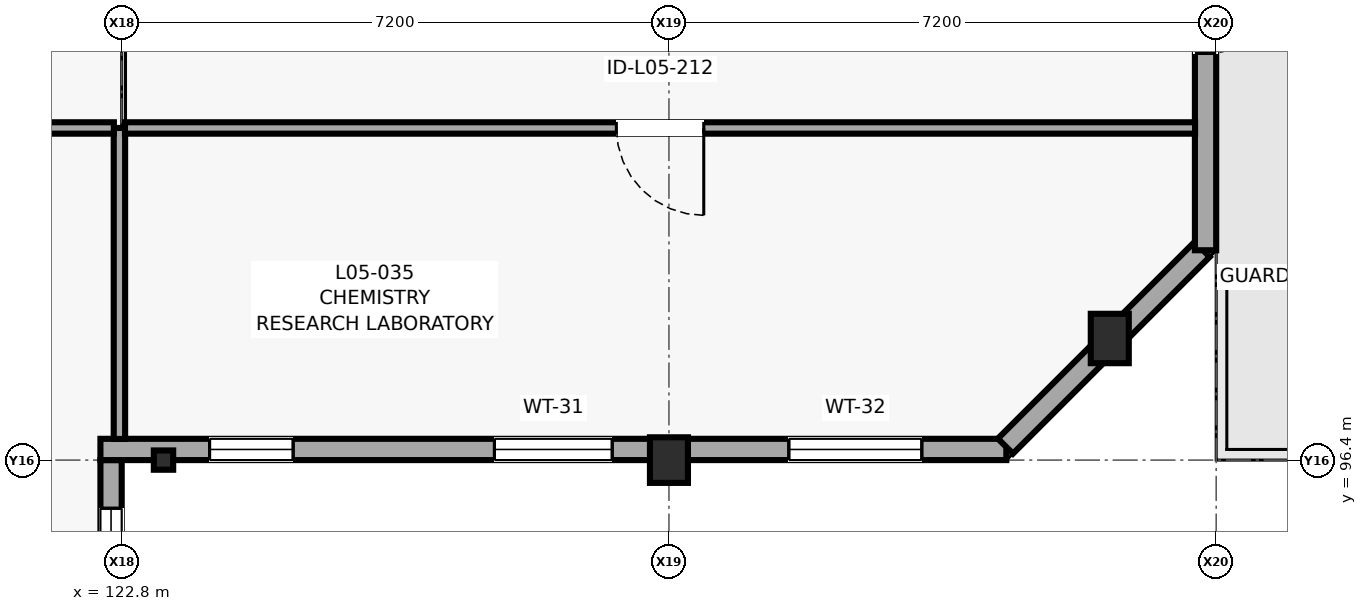
"""IFC4 building model, lengths in metres.
Left out: names, types, materials, properties, quantities, classifications, styles, units other than length and angle.
Written with IfcOpenShell. Run it as: python <this file> out.ifc"""

import sys

from ifc_helpers import new_model, si_unit, direction, frame, frame_2d, origin, origin_2d, place, context, subcontext, project, spatial, polyline, rectangle, i_section, outline, extrude, element, fill, save


model = new_model("IFC4")
c1 = context("Model", 3, precision=1e-05, world=origin(), true_north=direction((0.0, 1.0)))
c2 = subcontext(c1, "Body", "Model", "MODEL_VIEW")
j1 = project(units=[si_unit("LENGTHUNIT", "METRE"), si_unit("PLANEANGLEUNIT", "RADIAN")], contexts=[c1])
p1 = place(None, origin())
s1 = spatial("IfcSite", under=j1, at=p1, CompositionType="ELEMENT")
p2 = place(p1, origin())
s2 = spatial("IfcBuilding", under=s1, at=p2, CompositionType="ELEMENT")
p3 = place(p2, frame((0.0, 0.0, 20.2)))
s3 = spatial("IfcBuildingStorey", under=s2, at=p3, CompositionType="ELEMENT", Elevation=20.2)
p4 = place(p3, frame((123.35, 96.4, 0.0), z_axis=(0.0, 0.0, 1.0), x_axis=(1.0, 0.0, 0.0)))
e1 = element("IfcColumn", 1, at=p4, inside=s3, PredefinedType="COLUMN", context=c2, shape_type="SweptSolid", body=[
    extrude(i_section(OverallWidth=0.255, OverallDepth=0.254, WebThickness=0.009, FlangeThickness=0.014, FilletRadius=0.013, at=origin_2d()), origin(), (0.0, 0.0, 1.0), 4.0),
])
p5 = place(p3, frame((130.0, 96.4, 0.0), z_axis=(0.0, 0.0, 1.0), x_axis=(1.0, 0.0, 0.0)))
e2 = element("IfcColumn", 2, at=p5, inside=s3, PredefinedType="PILASTER", context=c2, shape_type="SweptSolid", body=[
    extrude(rectangle(XDim=0.5, YDim=0.6, at=origin_2d()), origin(), (0.0, 0.0, 1.0), 4.0),
])
p6 = place(p3, frame((135.8, 98.0, 0.0), z_axis=(0.0, 0.0, 1.0), x_axis=(1.0, 0.0, 0.0)))
e3 = element("IfcColumn", 3, at=p6, inside=s3, PredefinedType="COLUMN", context=c2, shape_type="SweptSolid", body=[
    extrude(rectangle(XDim=0.5, YDim=0.65, at=origin_2d()), origin(), (0.0, 0.0, 1.0), 4.0),
])
p7 = place(p3, frame((122.66, 80.13, 0.0), z_axis=(0.0, 0.0, 1.0), x_axis=(0.0, 1.0, 0.0)))
e4 = element("IfcWall", 4, at=p7, inside=s3, PredefinedType="SOLIDWALL", context=c2, shape_type="SweptSolid", body=[
    extrude(rectangle(XDim=16.27, YDim=0.28, at=frame_2d((8.135, 0.0))), origin(), (0.0, 0.0, 1.0), 3.205),
])
p8 = place(p7, frame((1.134, 0.0, 0.75)))
e5 = element("IfcOpeningElement", 5, at=p8, cuts=e4, PredefinedType="OPENING", context=c2, shape_type="SweptSolid", body=[
    extrude(rectangle(XDim=1.8, YDim=2.25, at=frame_2d((0.9, 1.125))), frame((0.0, 0.15, 0.0), z_axis=(0.0, -1.0, 0.0), x_axis=(1.0, 0.0, 0.0)), (0.0, 0.0, 1.0), 0.3),
])
p9 = place(p7, frame((6.251, 0.0, 0.665)))
e6 = element("IfcOpeningElement", 6, at=p9, cuts=e4, PredefinedType="OPENING", context=c2, shape_type="SweptSolid", body=[
    extrude(rectangle(XDim=1.4, YDim=2.4, at=frame_2d((0.7, 1.2))), frame((0.0, 0.15, 0.0), z_axis=(0.0, -1.0, 0.0), x_axis=(1.0, 0.0, 0.0)), (0.0, 0.0, 1.0), 0.3),
])
p10 = place(p7, frame((9.169, 0.0, 0.75)))
e7 = element("IfcOpeningElement", 7, at=p10, cuts=e4, PredefinedType="OPENING", context=c2, shape_type="SweptSolid", body=[
    extrude(rectangle(XDim=2.0, YDim=2.1, at=frame_2d((1.0, 1.05))), frame((0.0, 0.15, 0.0), z_axis=(0.0, -1.0, 0.0), x_axis=(1.0, 0.0, 0.0)), (0.0, 0.0, 1.0), 0.3),
])
p11 = place(p7, frame((14.536, 0.0, 0.75)))
e8 = element("IfcOpeningElement", 8, at=p11, cuts=e4, PredefinedType="OPENING", context=c2, shape_type="SweptSolid", body=[
    extrude(rectangle(XDim=1.1, YDim=2.1, at=frame_2d((0.55, 1.05))), frame((0.0, 0.15, 0.0), z_axis=(0.0, -1.0, 0.0), x_axis=(1.0, 0.0, 0.0)), (0.0, 0.0, 1.0), 0.3),
])
p12 = place(p3, frame((122.52, 96.54, 0.0), z_axis=(0.0, 0.0, 1.0), x_axis=(1.0, 0.0, 0.0)))
e9 = element("IfcWall", 9, at=p12, inside=s3, PredefinedType="SOLIDWALL", context=c2, shape_type="SweptSolid", body=[
    extrude(rectangle(XDim=11.919, YDim=0.28, at=frame_2d((5.959, 0.0))), origin(), (0.0, 0.0, 1.0), 3.005),
])
p13 = place(p12, frame((1.436, 0.0, 0.75)))
e10 = element("IfcOpeningElement", 10, at=p13, cuts=e9, PredefinedType="OPENING", context=c2, shape_type="SweptSolid", body=[
    extrude(rectangle(XDim=1.1, YDim=2.1, at=frame_2d((0.55, 1.05))), frame((0.0, 0.15, 0.0), z_axis=(0.0, -1.0, 0.0), x_axis=(1.0, 0.0, 0.0)), (0.0, 0.0, 1.0), 0.3),
])
p14 = place(p12, frame((5.184, 0.0, 0.85)))
e11 = element("IfcOpeningElement", 11, at=p14, cuts=e9, PredefinedType="OPENING", context=c2, shape_type="SweptSolid", body=[
    extrude(rectangle(XDim=1.55, YDim=1.85, at=frame_2d((0.775, 0.925))), frame((0.0, 0.15, 0.0), z_axis=(0.0, -1.0, 0.0), x_axis=(1.0, 0.0, 0.0)), (0.0, 0.0, 1.0), 0.3),
])
p15 = place(p12, frame((9.057, 0.0, 0.75)))
e12 = element("IfcOpeningElement", 12, at=p15, cuts=e9, PredefinedType="OPENING", context=c2, shape_type="SweptSolid", body=[
    extrude(rectangle(XDim=1.75, YDim=2.05, at=frame_2d((0.875, 1.025))), frame((0.0, 0.15, 0.0), z_axis=(0.0, -1.0, 0.0), x_axis=(1.0, 0.0, 0.0)), (0.0, 0.0, 1.0), 0.3),
])
p16 = place(p3, frame((134.427, 96.584, 0.0), z_axis=(0.0, 0.0, 1.0), x_axis=(0.707106781187, 0.707106781187, 0.0)))
e13 = element("IfcWall", 13, at=p16, inside=s3, PredefinedType="SOLIDWALL", context=c2, shape_type="SweptSolid", body=[
    extrude(rectangle(XDim=3.662, YDim=0.28, at=frame_2d((1.831, 0.0))), origin(), (0.0, 0.0, 1.0), 3.78),
])
p17 = place(p3, frame((137.06, 99.161, 0.0), z_axis=(0.0, 0.0, 1.0), x_axis=(0.0, 1.0, 0.0)))
e14 = element("IfcWall", 14, at=p17, inside=s3, PredefinedType="SOLIDWALL", context=c2, shape_type="SweptSolid", body=[
    extrude(rectangle(XDim=10.078, YDim=0.28, at=frame_2d((5.039, 0.0))), origin(), (0.0, 0.0, 1.0), 3.78),
])
p18 = place(p17, frame((2.589, 0.0, 0.0)))
e15 = element("IfcOpeningElement", 15, at=p18, cuts=e14, PredefinedType="OPENING", context=c2, shape_type="SweptSolid", body=[
    extrude(rectangle(XDim=1.1, YDim=2.15, at=frame_2d((0.55, 1.075))), frame((0.0, 0.15, 0.0), z_axis=(0.0, -1.0, 0.0), x_axis=(1.0, 0.0, 0.0)), (0.0, 0.0, 1.0), 0.3),
])
p19 = place(p17, frame((6.509, 0.0, 0.85)))
e16 = element("IfcOpeningElement", 16, at=p19, cuts=e14, PredefinedType="OPENING", context=c2, shape_type="SweptSolid", body=[
    extrude(rectangle(XDim=2.1, YDim=1.8, at=frame_2d((1.05, 0.9))), frame((0.0, 0.15, 0.0), z_axis=(0.0, -1.0, 0.0), x_axis=(1.0, 0.0, 0.0)), (0.0, 0.0, 1.0), 0.3),
])
p20 = place(p3, frame((122.702, 80.045, 4.0), z_axis=(0.0, 0.0, 1.0), x_axis=(0.0, 1.0, 0.0)))
e17 = element("IfcWall", 17, at=p20, inside=s3, PredefinedType="PARAPET", context=c2, shape_type="SweptSolid", body=[
    extrude(outline(polyline([(0.0, 0.0), (23.96, 0.0), (23.96, 1.12), (16.293, 1.12), (16.243, 1.46), (7.717, 1.46), (7.667, 1.12), (0.0, 1.12), (0.0, 0.0)])), frame((0.0, 0.098, 0.0), z_axis=(0.0, -1.0, 0.0), x_axis=(1.0, 0.0, 0.0)), (0.0, 0.0, 1.0), 0.195),
])
p21 = place(p3, frame((134.429, 96.527, 4.0), z_axis=(0.0, 0.0, 1.0), x_axis=(0.707139427683, 0.707074133183, 0.0)))
e18 = element("IfcWall", 18, at=p21, inside=s3, PredefinedType="PARAPET", context=c2, shape_type="SweptSolid", body=[
    extrude(rectangle(XDim=3.739, YDim=0.165, at=frame_2d((1.87, 0.0))), origin(), (0.0, 0.0, 1.0), 1.12),
])
p22 = place(p3, frame((137.102, 99.161, 4.0), z_axis=(0.0, 0.0, 1.0), x_axis=(0.0, 1.0, 0.0)))
e19 = element("IfcWall", 19, at=p22, inside=s3, PredefinedType="PARAPET", context=c2, shape_type="SweptSolid", body=[
    extrude(outline(polyline([(0.0, 0.0), (10.078, 0.0), (10.078, 1.12), (6.853, 1.12), (6.803, 1.46), (3.275, 1.46), (3.225, 1.12), (0.0, 1.12), (0.0, 0.0)])), frame((0.0, 0.098, 0.0), z_axis=(0.0, -1.0, 0.0), x_axis=(1.0, 0.0, 0.0)), (0.0, 0.0, 1.0), 0.195),
])
p23 = place(p3, frame((122.948, 111.805, 4.0), z_axis=(0.0, 0.0, 1.0), x_axis=(0.0, -1.0, 0.0)))
e20 = element("IfcWall", 20, at=p23, inside=s3, PredefinedType="PARAPET", context=c2, shape_type="SweptSolid", body=[
    extrude(outline(polyline([(0.0, 0.0), (15.209, 0.0), (15.209, 1.12), (10.342, 1.12), (10.292, 1.46), (4.917, 1.46), (4.867, 1.12), (0.0, 1.12), (0.0, 0.0)])), frame((0.0, 0.098, 0.0), z_axis=(0.0, -1.0, 0.0), x_axis=(1.0, 0.0, 0.0)), (0.0, 0.0, 1.0), 0.195),
])
p24 = place(p3, frame((122.85, 96.498, 4.0), z_axis=(0.0, 0.0, 1.0), x_axis=(1.0, 0.0, 0.0)))
e21 = element("IfcWall", 21, at=p24, inside=s3, PredefinedType="PARAPET", context=c2, shape_type="SweptSolid", body=[
    extrude(outline(polyline([(0.0, 0.0), (11.589, 0.0), (11.589, 1.12), (7.881, 1.12), (7.831, 1.46), (3.758, 1.46), (3.708, 1.12), (0.0, 1.12), (0.0, 0.0)])), frame((0.0, 0.098, 0.0), z_axis=(0.0, -1.0, 0.0), x_axis=(1.0, 0.0, 0.0)), (0.0, 0.0, 1.0), 0.195),
])
p25 = place(p3, frame((122.77, 96.678, 0.0), z_axis=(0.0, 0.0, 1.0), x_axis=(0.0, 1.0, 0.0)))
e22 = element("IfcWall", 22, at=p25, inside=s3, PredefinedType="PARTITIONING", context=c2, shape_type="SweptSolid", body=[
    extrude(rectangle(XDim=4.092, YDim=0.15, at=frame_2d((2.046, 0.0))), origin(), (0.0, 0.0, 1.0), 3.755),
])
p26 = place(p3, frame((122.697, 100.77, 0.0), z_axis=(0.0, 0.0, 1.0), x_axis=(-1.0, 0.0, 0.0)))
e23 = element("IfcWall", 23, at=p26, inside=s3, PredefinedType="PARTITIONING", context=c2, shape_type="SweptSolid", body=[
    extrude(rectangle(XDim=4.009, YDim=0.15, at=frame_2d((2.004, 0.0))), origin(), (0.0, 0.0, 1.0), 3.755),
])
p27 = place(p3, frame((136.922, 100.77, 0.0), z_axis=(0.0, 0.0, 1.0), x_axis=(-1.0, 0.0, 0.0)))
e24 = element("IfcWall", 24, at=p27, inside=s3, PredefinedType="PARTITIONING", context=c2, shape_type="SweptSolid", body=[
    extrude(rectangle(XDim=14.079, YDim=0.15, at=frame_2d((7.04, 0.0))), origin(), (0.0, 0.0, 1.0), 3.755),
])
p28 = place(p27, frame((6.464, 0.0, 0.0)))
e25 = element("IfcOpeningElement", 25, at=p28, cuts=e24, PredefinedType="OPENING", context=c2, shape_type="SweptSolid", body=[
    extrude(rectangle(XDim=1.15, YDim=2.2, at=frame_2d((0.575, 1.1))), frame((0.0, 0.085, 0.0), z_axis=(0.0, -1.0, 0.0), x_axis=(1.0, 0.0, 0.0)), (0.0, 0.0, 1.0), 0.17),
])
p29 = place(p18, frame((1.1, 0.0, 0.0), z_axis=(0.0, 0.0, 1.0), x_axis=(-1.0, 0.0, 0.0)))
e26 = element("IfcDoor", 26, at=p29, inside=s3, OperationType="SINGLE_SWING_RIGHT", PredefinedType="DOOR", context=c2, shape_type="SweptSolid", body=[
    extrude(rectangle(XDim=1.1, YDim=2.15, at=frame_2d((0.55, 1.075))), frame((0.0, 0.025, 0.0), z_axis=(0.0, -1.0, 0.0), x_axis=(1.0, 0.0, 0.0)), (0.0, 0.0, 1.0), 0.05),
])
fill(e15, e26)
p30 = place(p11, origin())
e27 = element("IfcWindow", 27, at=p30, inside=s3, PartitioningType="SINGLE_PANEL", PredefinedType="WINDOW", context=c2, shape_type="SweptSolid", body=[
    extrude(rectangle(XDim=1.1, YDim=2.1, at=frame_2d((0.55, 1.05))), frame((0.0, 0.03, 0.0), z_axis=(0.0, -1.0, 0.0), x_axis=(1.0, 0.0, 0.0)), (0.0, 0.0, 1.0), 0.06),
])
fill(e8, e27)
p31 = place(p13, origin())
e28 = element("IfcWindow", 28, at=p31, inside=s3, PartitioningType="SINGLE_PANEL", PredefinedType="WINDOW", context=c2, shape_type="SweptSolid", body=[
    extrude(rectangle(XDim=1.1, YDim=2.1, at=frame_2d((0.55, 1.05))), frame((0.0, 0.03, 0.0), z_axis=(0.0, -1.0, 0.0), x_axis=(1.0, 0.0, 0.0)), (0.0, 0.0, 1.0), 0.06),
])
fill(e10, e28)
p32 = place(p14, origin())
e29 = element("IfcWindow", 29, at=p32, inside=s3, PartitioningType="SINGLE_PANEL", PredefinedType="WINDOW", context=c2, shape_type="SweptSolid", body=[
    extrude(rectangle(XDim=1.55, YDim=1.85, at=frame_2d((0.775, 0.925))), frame((0.0, 0.03, 0.0), z_axis=(0.0, -1.0, 0.0), x_axis=(1.0, 0.0, 0.0)), (0.0, 0.0, 1.0), 0.06),
])
fill(e11, e29)
p33 = place(p15, origin())
e30 = element("IfcWindow", 30, at=p33, inside=s3, PartitioningType="SINGLE_PANEL", PredefinedType="WINDOW", context=c2, shape_type="SweptSolid", body=[
    extrude(rectangle(XDim=1.75, YDim=2.05, at=frame_2d((0.875, 1.025))), frame((0.0, 0.03, 0.0), z_axis=(0.0, -1.0, 0.0), x_axis=(1.0, 0.0, 0.0)), (0.0, 0.0, 1.0), 0.06),
])
fill(e12, e30)
p34 = place(p28, origin())
e31 = element("IfcDoor", 31, at=p34, inside=s3, OperationType="SINGLE_SWING_LEFT", PredefinedType="DOOR", context=c2, shape_type="SweptSolid", body=[
    extrude(rectangle(XDim=1.15, YDim=2.2, at=frame_2d((0.575, 1.1))), frame((0.0, 0.025, 0.0), z_axis=(0.0, -1.0, 0.0), x_axis=(1.0, 0.0, 0.0)), (0.0, 0.0, 1.0), 0.05),
])
fill(e25, e31)
save(model, sys.argv[1])
